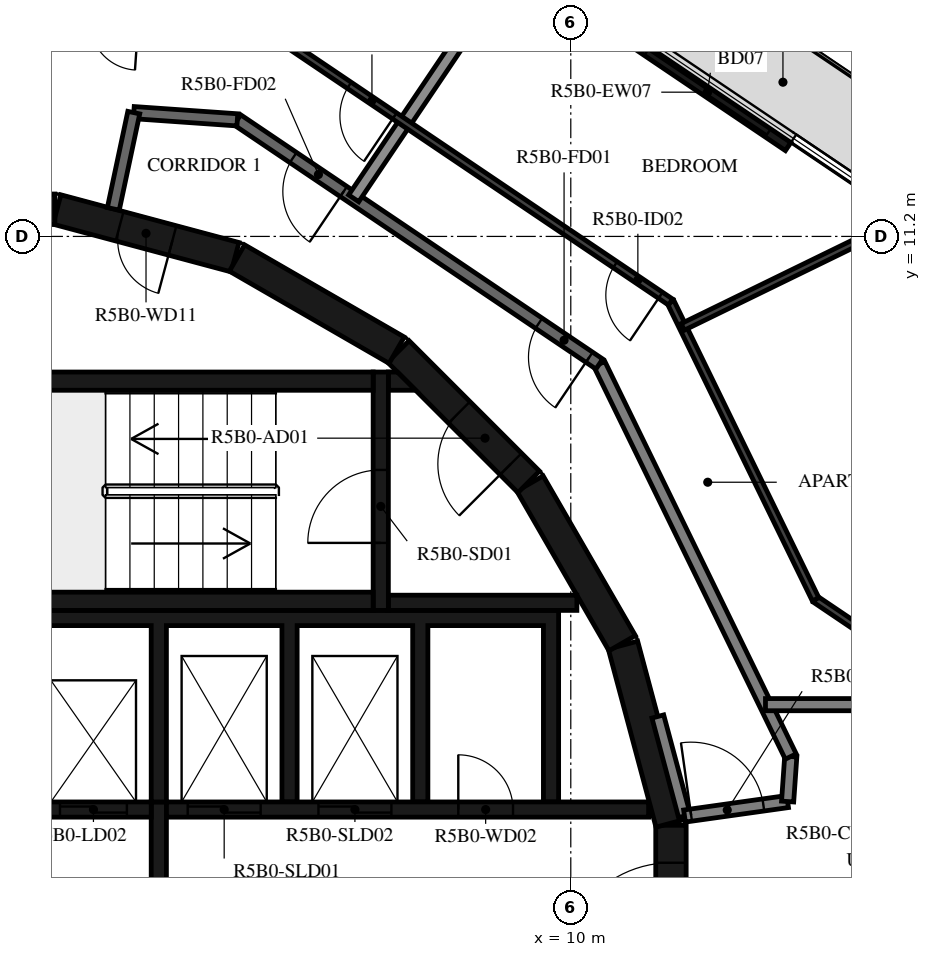
"""IFC4 building model, lengths in metres.
Left out: names, types, materials, properties, quantities, classifications, styles, units other than length and angle.
Written with IfcOpenShell. Run it as: python <this file> out.ifc"""

import sys

from ifc_helpers import new_model, si_unit, direction, frame, frame_2d, origin, place, context, subcontext, project, spatial, polyline, rectangle, outline, extrude, element, fill, save


model = new_model("IFC4")
c1 = context("Model", 3, precision=1e-05, world=origin(), true_north=direction((0.0, 1.0)))
c2 = subcontext(c1, "Body", "Model", "MODEL_VIEW")
j1 = project(units=[si_unit("LENGTHUNIT", "METRE"), si_unit("PLANEANGLEUNIT", "RADIAN")], contexts=[c1])
p1 = place(None, origin())
s1 = spatial("IfcSite", under=j1, at=p1, CompositionType="ELEMENT")
p2 = place(p1, origin())
s2 = spatial("IfcBuilding", under=s1, at=p2, CompositionType="ELEMENT")
p3 = place(p2, frame((0.0, 0.0, 202.4)))
s3 = spatial("IfcBuildingStorey", under=s2, at=p3, CompositionType="ELEMENT", Elevation=202.4)
p4 = place(p3, frame((13.574, 12.677, 0.0), z_axis=(0.0, 0.0, 1.0), x_axis=(-0.829068838882, 0.55914654644, 0.0)))
e1 = element("IfcWall", 1, at=p4, inside=s3, PredefinedType="STANDARD", context=c2, shape_type="SweptSolid", body=[
    extrude(rectangle(XDim=3.2, YDim=0.16, at=frame_2d((1.6, 0.0))), origin(), (0.0, 0.0, 1.0), 3.12),
])
p5 = place(p4, frame((0.4, 0.0, 0.0)))
e2 = element("IfcOpeningElement", 2, at=p5, cuts=e1, PredefinedType="OPENING", context=c2, shape_type="SweptSolid", body=[
    extrude(rectangle(XDim=2.4, YDim=2.4, at=frame_2d((1.2, 1.2))), frame((0.0, 0.09, 0.0), z_axis=(0.0, -1.0, 0.0), x_axis=(1.0, 0.0, 0.0)), (0.0, 0.0, 1.0), 0.18),
])
p6 = place(p3, frame((11.647, -1.516, 0.0), z_axis=(0.0, 0.0, 1.0), x_axis=(0.0, 1.0, 0.0)))
e3 = element("IfcWall", 3, at=p6, inside=s3, PredefinedType="SHEAR", context=c2, shape_type="SweptSolid", body=[
    extrude(rectangle(XDim=3.033, YDim=0.5, at=frame_2d((1.516, 0.0))), origin(), (0.0, 0.0, 1.0), 3.12),
])
p7 = place(p6, frame((0.616, 0.0, 0.0)))
e4 = element("IfcOpeningElement", 4, at=p7, cuts=e3, PredefinedType="OPENING", context=c2, shape_type="SweptSolid", body=[
    extrude(rectangle(XDim=1.8, YDim=2.1, at=frame_2d((0.9, 1.05))), frame((0.0, 0.26, 0.0), z_axis=(0.0, -1.0, 0.0), x_axis=(1.0, 0.0, 0.0)), (0.0, 0.0, 1.0), 0.52),
])
for number, where, z_axis, x_axis in (
    (5, (11.643, 1.55, 0.0), (0.0, 0.0, 1.0), (-0.259, 0.966, 0.0)),
    (6, (10.845, 4.51, 0.0), (0.0, 0.0, 1.0), (-0.5, 0.866, 0.0)),
):
    element("IfcWall", number, at=place(p3, frame(where, z_axis=z_axis, x_axis=x_axis)), inside=s3, PredefinedType="SHEAR", context=c2, shape_type="SweptSolid", body=[
        extrude(rectangle(XDim=3.033, YDim=0.5, at=frame_2d((1.516, 0.0))), origin(), (0.0, 0.0, 1.0), 3.12),
    ])
p8 = place(p3, frame((9.308, 7.164, 0.0), z_axis=(0.0, 0.0, 1.0), x_axis=(-0.707106781187, 0.707106781187, 0.0)))
e7 = element("IfcWall", 7, at=p8, inside=s3, PredefinedType="SHEAR", context=c2, shape_type="SweptSolid", body=[
    extrude(rectangle(XDim=3.032, YDim=0.5, at=frame_2d((1.516, 0.0))), origin(), (0.0, 0.0, 1.0), 3.12),
])
p9 = place(p8, frame((0.416, 0.0, 0.0)))
e8 = element("IfcOpeningElement", 8, at=p9, cuts=e7, PredefinedType="OPENING", context=c2, shape_type="SweptSolid", body=[
    extrude(rectangle(XDim=1.2, YDim=2.1, at=frame_2d((0.6, 1.05))), frame((0.0, 0.26, 0.0), z_axis=(0.0, -1.0, 0.0), x_axis=(1.0, 0.0, 0.0)), (0.0, 0.0, 1.0), 0.52),
])
p10 = place(p3, frame((7.137, 9.329, 0.0), z_axis=(0.0, 0.0, 1.0), x_axis=(-0.865975092491, 0.500087131594, 0.0)))
e9 = element("IfcWall", 9, at=p10, inside=s3, PredefinedType="SHEAR", context=c2, shape_type="SweptSolid", body=[
    extrude(rectangle(XDim=3.033, YDim=0.5, at=frame_2d((1.516, 0.0))), origin(), (0.0, 0.0, 1.0), 3.12),
])
p11 = place(p3, frame((4.479, 10.858, 0.0), z_axis=(0.0, 0.0, 1.0), x_axis=(-0.965948410781, 0.258734743916, 0.0)))
e10 = element("IfcWall", 10, at=p11, inside=s3, PredefinedType="SHEAR", context=c2, shape_type="SweptSolid", body=[
    extrude(rectangle(XDim=3.033, YDim=0.5, at=frame_2d((1.516, 0.0))), origin(), (0.0, 0.0, 1.0), 3.12),
])
p12 = place(p11, frame((1.066, 0.0, 0.0)))
e11 = element("IfcOpeningElement", 11, at=p12, cuts=e10, PredefinedType="OPENING", context=c2, shape_type="SweptSolid", body=[
    extrude(rectangle(XDim=0.9, YDim=2.1, at=frame_2d((0.45, 1.05))), frame((0.0, 0.26, 0.0), z_axis=(0.0, -1.0, 0.0), x_axis=(1.0, 0.0, 0.0)), (0.0, 0.0, 1.0), 0.52),
])
p13 = place(p3, frame((1.516, 11.647, 0.0), z_axis=(0.0, 0.0, 1.0), x_axis=(-1.0, 0.0, 0.0)))
e12 = element("IfcWall", 12, at=p13, inside=s3, PredefinedType="SHEAR", context=c2, shape_type="SweptSolid", body=[
    extrude(rectangle(XDim=3.033, YDim=0.5, at=frame_2d((1.516, 0.0))), origin(), (0.0, 0.0, 1.0), 3.12),
])
for number, where, z_axis, x_axis in (
    (13, (0.0, 5.2, 0.0), (0.0, 0.0, 1.0), (1.0, 0.0, 0.0)),
    (14, (0.0, 8.82, 0.0), (0.0, 0.0, 1.0), (1.0, 0.0, 0.0)),
):
    element("IfcWall", number, at=place(p3, frame(where, z_axis=z_axis, x_axis=x_axis)), inside=s3, PredefinedType="SHEAR", context=c2, shape_type="SweptSolid", body=[
        extrude(rectangle(XDim=6.75, YDim=0.3, at=frame_2d((3.375, 0.0))), origin(), (0.0, 0.0, 1.0), 3.12),
    ])
p14 = place(p3, frame((6.875, 5.05, 0.0), z_axis=(0.0, 0.0, 1.0), x_axis=(0.0, 1.0, 0.0)))
e15 = element("IfcWall", 15, at=p14, inside=s3, PredefinedType="SHEAR", context=c2, shape_type="SweptSolid", body=[
    extrude(rectangle(XDim=3.92, YDim=0.25, at=frame_2d((1.96, 0.0))), origin(), (0.0, 0.0, 1.0), 3.12),
])
p15 = place(p14, frame((1.11, 0.0, 0.0)))
e16 = element("IfcOpeningElement", 16, at=p15, cuts=e15, PredefinedType="OPENING", context=c2, shape_type="SweptSolid", body=[
    extrude(rectangle(XDim=1.2, YDim=2.1, at=frame_2d((0.6, 1.05))), frame((0.0, 0.135, 0.0), z_axis=(0.0, -1.0, 0.0), x_axis=(1.0, 0.0, 0.0)), (0.0, 0.0, 1.0), 0.27),
])
p16 = place(p3, frame((7.0, 5.175, 0.0), z_axis=(0.0, 0.0, 1.0), x_axis=(1.0, 0.0, 0.0)))
e17 = element("IfcWall", 17, at=p16, inside=s3, PredefinedType="SHEAR", context=c2, shape_type="SweptSolid", body=[
    extrude(rectangle(XDim=3.1, YDim=0.25, at=frame_2d((1.55, 0.0))), origin(), (0.0, 0.0, 1.0), 3.12),
])
p17 = place(p3, origin())
e18 = element("IfcWall", 18, at=p17, inside=s3, PredefinedType="SHEAR", context=c2, shape_type="SweptSolid", body=[
    extrude(outline(polyline([(7.448, 8.67), (7.0, 8.67), (7.0, 8.97), (7.148, 8.97), (7.448, 8.67)])), origin(), (0.0, 0.0, 1.0), 3.12),
])
p18 = place(p3, origin())
e19 = element("IfcWall", 19, at=p18, inside=s3, PredefinedType="SHEAR", context=c2, shape_type="SweptSolid", body=[
    extrude(outline(polyline([(-9.55, 4.8), (-1.2, 4.8), (-1.2, 1.9), (-0.95, 1.9), (-0.95, 4.8), (0.95, 4.8), (0.95, 1.9), (1.2, 1.9), (1.2, 4.8), (3.1, 4.8), (3.1, 1.9), (3.35, 1.9), (3.35, 4.8), (5.25, 4.8), (5.25, 1.9), (5.5, 1.9), (5.5, 4.8), (7.4, 4.8), (7.4, 1.9), (7.65, 1.9), (7.65, 4.8), (9.55, 4.8), (9.55, 1.9), (9.8, 1.9), (9.8, 4.8), (9.8, 5.05), (-9.8, 5.05), (-9.8, 4.8), (-9.8, 1.9), (-9.55, 1.9), (-9.55, 4.8)])), origin(), (0.0, 0.0, 1.0), 3.12),
])
p19 = place(p3, frame((-11.28, 1.775, 0.0), z_axis=(0.0, 0.0, 1.0), x_axis=(1.0, 0.0, 0.0)))
e20 = element("IfcWall", 20, at=p19, inside=s3, PredefinedType="SHEAR", context=c2, shape_type="SweptSolid", body=[
    extrude(rectangle(XDim=14.38, YDim=0.25, at=frame_2d((7.19, 0.0))), origin(), (0.0, 0.0, 1.0), 3.12),
])
p20 = place(p19, frame((10.73, 0.0, 0.0)))
e21 = element("IfcOpeningElement", 21, at=p20, cuts=e20, PredefinedType="OPENING", context=c2, shape_type="SweptSolid", body=[
    extrude(rectangle(XDim=1.1, YDim=2.1, at=frame_2d((0.55, 1.05))), frame((0.0, 0.135, 0.0), z_axis=(0.0, -1.0, 0.0), x_axis=(1.0, 0.0, 0.0)), (0.0, 0.0, 1.0), 0.27),
])
p21 = place(p19, frame((12.88, 0.0, 0.0)))
e22 = element("IfcOpeningElement", 22, at=p21, cuts=e20, PredefinedType="OPENING", context=c2, shape_type="SweptSolid", body=[
    extrude(rectangle(XDim=1.1, YDim=2.1, at=frame_2d((0.55, 1.05))), frame((0.0, 0.135, 0.0), z_axis=(0.0, -1.0, 0.0), x_axis=(1.0, 0.0, 0.0)), (0.0, 0.0, 1.0), 0.27),
])
p22 = place(p19, frame((5.455, 0.0, 0.0)))
e23 = element("IfcOpeningElement", 23, at=p22, cuts=e20, PredefinedType="OPENING", context=c2, shape_type="SweptSolid", body=[
    extrude(rectangle(XDim=0.9, YDim=2.1, at=frame_2d((0.45, 1.05))), frame((0.0, 0.135, 0.0), z_axis=(0.0, -1.0, 0.0), x_axis=(1.0, 0.0, 0.0)), (0.0, 0.0, 1.0), 0.27),
])
p23 = place(p3, frame((3.35, 1.775, 0.0), z_axis=(0.0, 0.0, 1.0), x_axis=(1.0, 0.0, 0.0)))
e24 = element("IfcWall", 24, at=p23, inside=s3, PredefinedType="SHEAR", context=c2, shape_type="SweptSolid", body=[
    extrude(rectangle(XDim=7.93, YDim=0.25, at=frame_2d((3.965, 0.0))), origin(), (0.0, 0.0, 1.0), 3.12),
])
p24 = place(p23, frame((0.35, 0.0, 0.0)))
e25 = element("IfcOpeningElement", 25, at=p24, cuts=e24, PredefinedType="OPENING", context=c2, shape_type="SweptSolid", body=[
    extrude(rectangle(XDim=1.2, YDim=2.4, at=frame_2d((0.6, 1.2))), frame((0.0, 0.135, 0.0), z_axis=(0.0, -1.0, 0.0), x_axis=(1.0, 0.0, 0.0)), (0.0, 0.0, 1.0), 0.27),
])
p25 = place(p23, frame((2.5, 0.0, 0.0)))
e26 = element("IfcOpeningElement", 26, at=p25, cuts=e24, PredefinedType="OPENING", context=c2, shape_type="SweptSolid", body=[
    extrude(rectangle(XDim=1.2, YDim=2.4, at=frame_2d((0.6, 1.2))), frame((0.0, 0.135, 0.0), z_axis=(0.0, -1.0, 0.0), x_axis=(1.0, 0.0, 0.0)), (0.0, 0.0, 1.0), 0.27),
])
p26 = place(p23, frame((4.8, 0.0, 0.0)))
e27 = element("IfcOpeningElement", 27, at=p26, cuts=e24, PredefinedType="OPENING", context=c2, shape_type="SweptSolid", body=[
    extrude(rectangle(XDim=0.9, YDim=2.1, at=frame_2d((0.45, 1.05))), frame((0.0, 0.135, 0.0), z_axis=(0.0, -1.0, 0.0), x_axis=(1.0, 0.0, 0.0)), (0.0, 0.0, 1.0), 0.27),
])
p27 = place(p3, frame((3.225, -1.9, 0.0), z_axis=(0.0, 0.0, 1.0), x_axis=(0.0, 1.0, 0.0)))
e28 = element("IfcWall", 28, at=p27, inside=s3, PredefinedType="SHEAR", context=c2, shape_type="SweptSolid", body=[
    extrude(rectangle(XDim=3.8, YDim=0.25, at=frame_2d((1.9, 0.0))), origin(), (0.0, 0.0, 1.0), 3.12),
])
p28 = place(p3, frame((11.87, 1.668, 0.0), z_axis=(0.0, 0.0, 1.0), x_axis=(-0.258836880648, 0.965921047093, 0.0)))
e29 = element("IfcWall", 29, at=p28, inside=s3, PredefinedType="STANDARD", context=c2, shape_type="SweptSolid", body=[
    extrude(rectangle(XDim=1.695, YDim=0.2, at=frame_2d((0.848, 0.0))), origin(), (0.0, 0.0, 1.0), 3.12),
])
p29 = place(p3, frame((11.87, 1.668, 0.0), z_axis=(0.0, 0.0, 1.0), x_axis=(0.990271931984, 0.139145609792, 0.0)))
e30 = element("IfcWall", 30, at=p29, inside=s3, PredefinedType="STANDARD", context=c2, shape_type="SweptSolid", body=[
    extrude(rectangle(XDim=1.712, YDim=0.2, at=frame_2d((0.856, 0.0))), origin(), (0.0, 0.0, 1.0), 3.12),
])
p30 = place(p29, frame((0.11, 0.0, 0.0)))
e31 = element("IfcOpeningElement", 31, at=p30, cuts=e30, PredefinedType="OPENING", context=c2, shape_type="SweptSolid", body=[
    extrude(rectangle(XDim=1.2, YDim=2.1, at=frame_2d((0.6, 1.05))), frame((0.0, 0.11, 0.0), z_axis=(0.0, -1.0, 0.0), x_axis=(1.0, 0.0, 0.0)), (0.0, 0.0, 1.0), 0.22),
])
p31 = place(p3, frame((13.566, 1.906, 0.0), z_axis=(0.0, 0.0, 1.0), x_axis=(0.07005495793, 0.997543133338, 0.0)))
e32 = element("IfcWall", 32, at=p31, inside=s3, PredefinedType="STANDARD", context=c2, shape_type="SweptSolid", body=[
    extrude(rectangle(XDim=0.742, YDim=0.2, at=frame_2d((0.371, 0.0))), origin(), (0.0, 0.0, 1.0), 3.12),
])
p32 = place(p3, frame((13.618, 2.647, 0.0), z_axis=(0.0, 0.0, 1.0), x_axis=(-0.438366026218, 0.898796543751, 0.0)))
e33 = element("IfcWall", 33, at=p32, inside=s3, PredefinedType="STANDARD", context=c2, shape_type="SweptSolid", body=[
    extrude(rectangle(XDim=7.181, YDim=0.2, at=frame_2d((3.591, 0.0))), origin(), (0.0, 0.0, 1.0), 3.12),
])
p33 = place(p3, frame((10.47, 9.101, 0.0), z_axis=(0.0, 0.0, 1.0), x_axis=(-0.829035841718, 0.559195469534, 0.0)))
e34 = element("IfcWall", 34, at=p33, inside=s3, PredefinedType="STANDARD", context=c2, shape_type="SweptSolid", body=[
    extrude(rectangle(XDim=7.181, YDim=0.2, at=frame_2d((3.591, 0.0))), origin(), (0.0, 0.0, 1.0), 3.12),
])
p34 = place(p33, frame((0.2, 0.0, 0.0)))
e35 = element("IfcOpeningElement", 35, at=p34, cuts=e34, PredefinedType="OPENING", context=c2, shape_type="SweptSolid", body=[
    extrude(rectangle(XDim=1.0, YDim=2.1, at=frame_2d((0.5, 1.05))), frame((0.0, 0.11, 0.0), z_axis=(0.0, -1.0, 0.0), x_axis=(1.0, 0.0, 0.0)), (0.0, 0.0, 1.0), 0.22),
])
p35 = place(p33, frame((5.073, 0.0, 0.0)))
e36 = element("IfcOpeningElement", 36, at=p35, cuts=e34, PredefinedType="OPENING", context=c2, shape_type="SweptSolid", body=[
    extrude(rectangle(XDim=1.0, YDim=2.1, at=frame_2d((0.5, 1.05))), frame((0.0, 0.11, 0.0), z_axis=(0.0, -1.0, 0.0), x_axis=(1.0, 0.0, 0.0)), (0.0, 0.0, 1.0), 0.22),
])
p36 = place(p3, frame((4.517, 13.117, 0.0), z_axis=(0.0, 0.0, 1.0), x_axis=(-0.997562153664, 0.069783591025, 0.0)))
e37 = element("IfcWall", 37, at=p36, inside=s3, PredefinedType="STANDARD", context=c2, shape_type="SweptSolid", body=[
    extrude(rectangle(XDim=1.707, YDim=0.2, at=frame_2d((0.854, 0.0))), origin(), (0.0, 0.0, 1.0), 3.12),
])
p37 = place(p3, frame((2.813, 13.236, 0.0), z_axis=(0.0, 0.0, 1.0), x_axis=(-0.207911086063, -0.978147729278, 0.0)))
e38 = element("IfcWall", 38, at=p37, inside=s3, PredefinedType="STANDARD", context=c2, shape_type="SweptSolid", body=[
    extrude(rectangle(XDim=1.618, YDim=0.2, at=frame_2d((0.809, 0.0))), origin(), (0.0, 0.0, 1.0), 3.12),
])
p38 = place(p3, frame((17.9, 3.5, 0.0), z_axis=(0.0, 0.0, 1.0), x_axis=(-1.0, 0.0, 0.0)))
e39 = element("IfcWall", 39, at=p38, inside=s3, PredefinedType="STANDARD", context=c2, shape_type="SweptSolid", body=[
    extrude(rectangle(XDim=4.698, YDim=0.2, at=frame_2d((2.349, 0.0))), origin(), (0.0, 0.0, 1.0), 3.12),
])
p39 = place(p3, frame((9.104, 15.79, 0.0), z_axis=(0.0, 0.0, 1.0), x_axis=(-0.559193912135, -0.829036892201, 0.0)))
e40 = element("IfcWall", 40, at=p39, inside=s3, PredefinedType="STANDARD", context=c2, shape_type="SweptSolid", body=[
    extrude(rectangle(XDim=4.781, YDim=0.2, at=frame_2d((2.39, 0.0))), origin(), (0.0, 0.0, 1.0), 2.73),
])
p40 = place(p3, frame((14.654, 4.808, 0.0), z_axis=(0.0, 0.0, 1.0), x_axis=(-0.829065184024, 0.559151965604, 0.0)))
e41 = element("IfcWall", 41, at=p40, inside=s3, PredefinedType="PARTITIONING", context=c2, shape_type="SweptSolid", body=[
    extrude(rectangle(XDim=0.758, YDim=0.12, at=frame_2d((0.379, 0.0))), origin(), (0.0, 0.0, 1.0), 3.12),
])
p41 = place(p3, frame((14.026, 5.232, 0.0), z_axis=(0.0, 0.0, 1.0), x_axis=(-0.438374985284, 0.89879217413, 0.0)))
e42 = element("IfcWall", 42, at=p41, inside=s3, PredefinedType="PARTITIONING", context=c2, shape_type="SweptSolid", body=[
    extrude(rectangle(XDim=5.438, YDim=0.12, at=frame_2d((2.719, 0.0))), origin(), (0.0, 0.0, 1.0), 3.12),
])
p42 = place(p3, frame((11.642, 10.12, 0.0), z_axis=(0.0, 0.0, 1.0), x_axis=(-0.829032241779, 0.55920080659, 0.0)))
e43 = element("IfcWall", 43, at=p42, inside=s3, PredefinedType="PARTITIONING", context=c2, shape_type="SweptSolid", body=[
    extrude(rectangle(XDim=7.985, YDim=0.12, at=frame_2d((3.992, 0.0))), origin(), (0.0, 0.0, 1.0), 3.12),
])
p43 = place(p42, frame((0.2, 0.0, 0.0)))
e44 = element("IfcOpeningElement", 44, at=p43, cuts=e43, PredefinedType="OPENING", context=c2, shape_type="SweptSolid", body=[
    extrude(rectangle(XDim=0.9, YDim=2.1, at=frame_2d((0.45, 1.05))), frame((0.0, 0.07, 0.0), z_axis=(0.0, -1.0, 0.0), x_axis=(1.0, 0.0, 0.0)), (0.0, 0.0, 1.0), 0.14),
])
p44 = place(p42, frame((5.475, 0.0, 0.0)))
e45 = element("IfcOpeningElement", 45, at=p44, cuts=e43, PredefinedType="OPENING", context=c2, shape_type="SweptSolid", body=[
    extrude(rectangle(XDim=0.9, YDim=2.1, at=frame_2d((0.45, 1.05))), frame((0.0, 0.07, 0.0), z_axis=(0.0, -1.0, 0.0), x_axis=(1.0, 0.0, 0.0)), (0.0, 0.0, 1.0), 0.14),
])
p45 = place(p3, frame((15.482, 11.487, 0.0), z_axis=(0.0, 0.0, 1.0), x_axis=(-0.898807251285, -0.438344071521, 0.0)))
e46 = element("IfcWall", 46, at=p45, inside=s3, PredefinedType="PARTITIONING", context=c2, shape_type="SweptSolid", body=[
    extrude(rectangle(XDim=4.051, YDim=0.12, at=frame_2d((2.025, 0.0))), origin(), (0.0, 0.0, 1.0), 3.12),
])
p46 = place(p5, origin())
e47 = element("IfcDoor", 47, at=p46, inside=s3, OperationType="DOUBLE_DOOR_SLIDING", PredefinedType="DOOR", context=c2, shape_type="SweptSolid", body=[
    extrude(rectangle(XDim=2.4, YDim=2.4, at=frame_2d((1.2, 1.2))), frame((0.0, 0.025, 0.0), z_axis=(0.0, -1.0, 0.0), x_axis=(1.0, 0.0, 0.0)), (0.0, 0.0, 1.0), 0.05),
])
fill(e2, e47)
p47 = place(p15, origin())
e48 = element("IfcDoor", 48, at=p47, inside=s3, OperationType="SINGLE_SWING_LEFT", PredefinedType="DOOR", context=c2, shape_type="SweptSolid", body=[
    extrude(rectangle(XDim=1.2, YDim=2.1, at=frame_2d((0.6, 1.05))), frame((0.0, 0.025, 0.0), z_axis=(0.0, -1.0, 0.0), x_axis=(1.0, 0.0, 0.0)), (0.0, 0.0, 1.0), 0.05),
])
fill(e16, e48)
p48 = place(p9, origin())
e49 = element("IfcDoor", 49, at=p48, inside=s3, OperationType="SINGLE_SWING_RIGHT", PredefinedType="DOOR", context=c2, shape_type="SweptSolid", body=[
    extrude(rectangle(XDim=1.2, YDim=2.1, at=frame_2d((0.6, 1.05))), frame((0.0, 0.025, 0.0), z_axis=(0.0, -1.0, 0.0), x_axis=(1.0, 0.0, 0.0)), (0.0, 0.0, 1.0), 0.05),
])
fill(e8, e49)
p49 = place(p7, origin())
e50 = element("IfcDoor", 50, at=p49, inside=s3, OperationType="DOUBLE_DOOR_SINGLE_SWING", PredefinedType="DOOR", context=c2, shape_type="SweptSolid", body=[
    extrude(rectangle(XDim=1.8, YDim=2.1, at=frame_2d((0.9, 1.05))), frame((0.0, 0.025, 0.0), z_axis=(0.0, -1.0, 0.0), x_axis=(1.0, 0.0, 0.0)), (0.0, 0.0, 1.0), 0.05),
])
fill(e4, e50)
p50 = place(p21, origin())
e51 = element("IfcDoor", 51, at=p50, inside=s3, OperationType="DOUBLE_DOOR_SLIDING", PredefinedType="DOOR", context=c2, shape_type="SweptSolid", body=[
    extrude(rectangle(XDim=1.1, YDim=2.1, at=frame_2d((0.55, 1.05))), frame((0.0, 0.025, 0.0), z_axis=(0.0, -1.0, 0.0), x_axis=(1.0, 0.0, 0.0)), (0.0, 0.0, 1.0), 0.05),
])
fill(e22, e51)
p51 = place(p24, origin())
e52 = element("IfcDoor", 52, at=p51, inside=s3, OperationType="DOUBLE_DOOR_SLIDING", PredefinedType="DOOR", context=c2, shape_type="SweptSolid", body=[
    extrude(rectangle(XDim=1.2, YDim=2.4, at=frame_2d((0.6, 1.2))), frame((0.0, 0.025, 0.0), z_axis=(0.0, -1.0, 0.0), x_axis=(1.0, 0.0, 0.0)), (0.0, 0.0, 1.0), 0.05),
])
fill(e25, e52)
p52 = place(p25, origin())
e53 = element("IfcDoor", 53, at=p52, inside=s3, OperationType="DOUBLE_DOOR_SLIDING", PredefinedType="DOOR", context=c2, shape_type="SweptSolid", body=[
    extrude(rectangle(XDim=1.2, YDim=2.4, at=frame_2d((0.6, 1.2))), frame((0.0, 0.025, 0.0), z_axis=(0.0, -1.0, 0.0), x_axis=(1.0, 0.0, 0.0)), (0.0, 0.0, 1.0), 0.05),
])
fill(e26, e53)
p53 = place(p26, origin())
e54 = element("IfcDoor", 54, at=p53, inside=s3, OperationType="SINGLE_SWING_RIGHT", PredefinedType="DOOR", context=c2, shape_type="SweptSolid", body=[
    extrude(rectangle(XDim=0.9, YDim=2.1, at=frame_2d((0.45, 1.05))), frame((0.0, 0.025, 0.0), z_axis=(0.0, -1.0, 0.0), x_axis=(1.0, 0.0, 0.0)), (0.0, 0.0, 1.0), 0.05),
])
fill(e27, e54)
p54 = place(p12, origin())
e55 = element("IfcDoor", 55, at=p54, inside=s3, OperationType="SINGLE_SWING_LEFT", PredefinedType="DOOR", context=c2, shape_type="SweptSolid", body=[
    extrude(rectangle(XDim=0.9, YDim=2.1, at=frame_2d((0.45, 1.05))), frame((0.0, 0.025, 0.0), z_axis=(0.0, -1.0, 0.0), x_axis=(1.0, 0.0, 0.0)), (0.0, 0.0, 1.0), 0.05),
])
fill(e11, e55)
p55 = place(p34, origin())
e56 = element("IfcDoor", 56, at=p55, inside=s3, OperationType="SINGLE_SWING_LEFT", PredefinedType="DOOR", context=c2, shape_type="SweptSolid", body=[
    extrude(rectangle(XDim=1.0, YDim=2.1, at=frame_2d((0.5, 1.05))), frame((0.0, 0.025, 0.0), z_axis=(0.0, -1.0, 0.0), x_axis=(1.0, 0.0, 0.0)), (0.0, 0.0, 1.0), 0.05),
])
fill(e35, e56)
p56 = place(p43, origin())
e57 = element("IfcDoor", 57, at=p56, inside=s3, OperationType="SINGLE_SWING_LEFT", PredefinedType="DOOR", context=c2, shape_type="SweptSolid", body=[
    extrude(rectangle(XDim=0.9, YDim=2.1, at=frame_2d((0.45, 1.05))), frame((0.0, 0.025, 0.0), z_axis=(0.0, -1.0, 0.0), x_axis=(1.0, 0.0, 0.0)), (0.0, 0.0, 1.0), 0.05),
])
fill(e44, e57)
p57 = place(p35, origin())
e58 = element("IfcDoor", 58, at=p57, inside=s3, OperationType="SINGLE_SWING_RIGHT", PredefinedType="DOOR", context=c2, shape_type="SweptSolid", body=[
    extrude(rectangle(XDim=1.0, YDim=2.1, at=frame_2d((0.5, 1.05))), frame((0.0, 0.025, 0.0), z_axis=(0.0, -1.0, 0.0), x_axis=(1.0, 0.0, 0.0)), (0.0, 0.0, 1.0), 0.05),
])
fill(e36, e58)
p58 = place(p44, origin())
e59 = element("IfcDoor", 59, at=p58, inside=s3, OperationType="SINGLE_SWING_RIGHT", PredefinedType="DOOR", context=c2, shape_type="SweptSolid", body=[
    extrude(rectangle(XDim=0.9, YDim=2.1, at=frame_2d((0.45, 1.05))), frame((0.0, 0.025, 0.0), z_axis=(0.0, -1.0, 0.0), x_axis=(1.0, 0.0, 0.0)), (0.0, 0.0, 1.0), 0.05),
])
fill(e45, e59)
p59 = place(p30, origin())
e60 = element("IfcDoor", 60, at=p59, inside=s3, OperationType="DOUBLE_DOOR_SINGLE_SWING", PredefinedType="DOOR", context=c2, shape_type="SweptSolid", body=[
    extrude(rectangle(XDim=1.2, YDim=2.1, at=frame_2d((0.6, 1.05))), frame((0.0, 0.025, 0.0), z_axis=(0.0, -1.0, 0.0), x_axis=(1.0, 0.0, 0.0)), (0.0, 0.0, 1.0), 0.05),
])
fill(e31, e60)
save(model, sys.argv[1])
